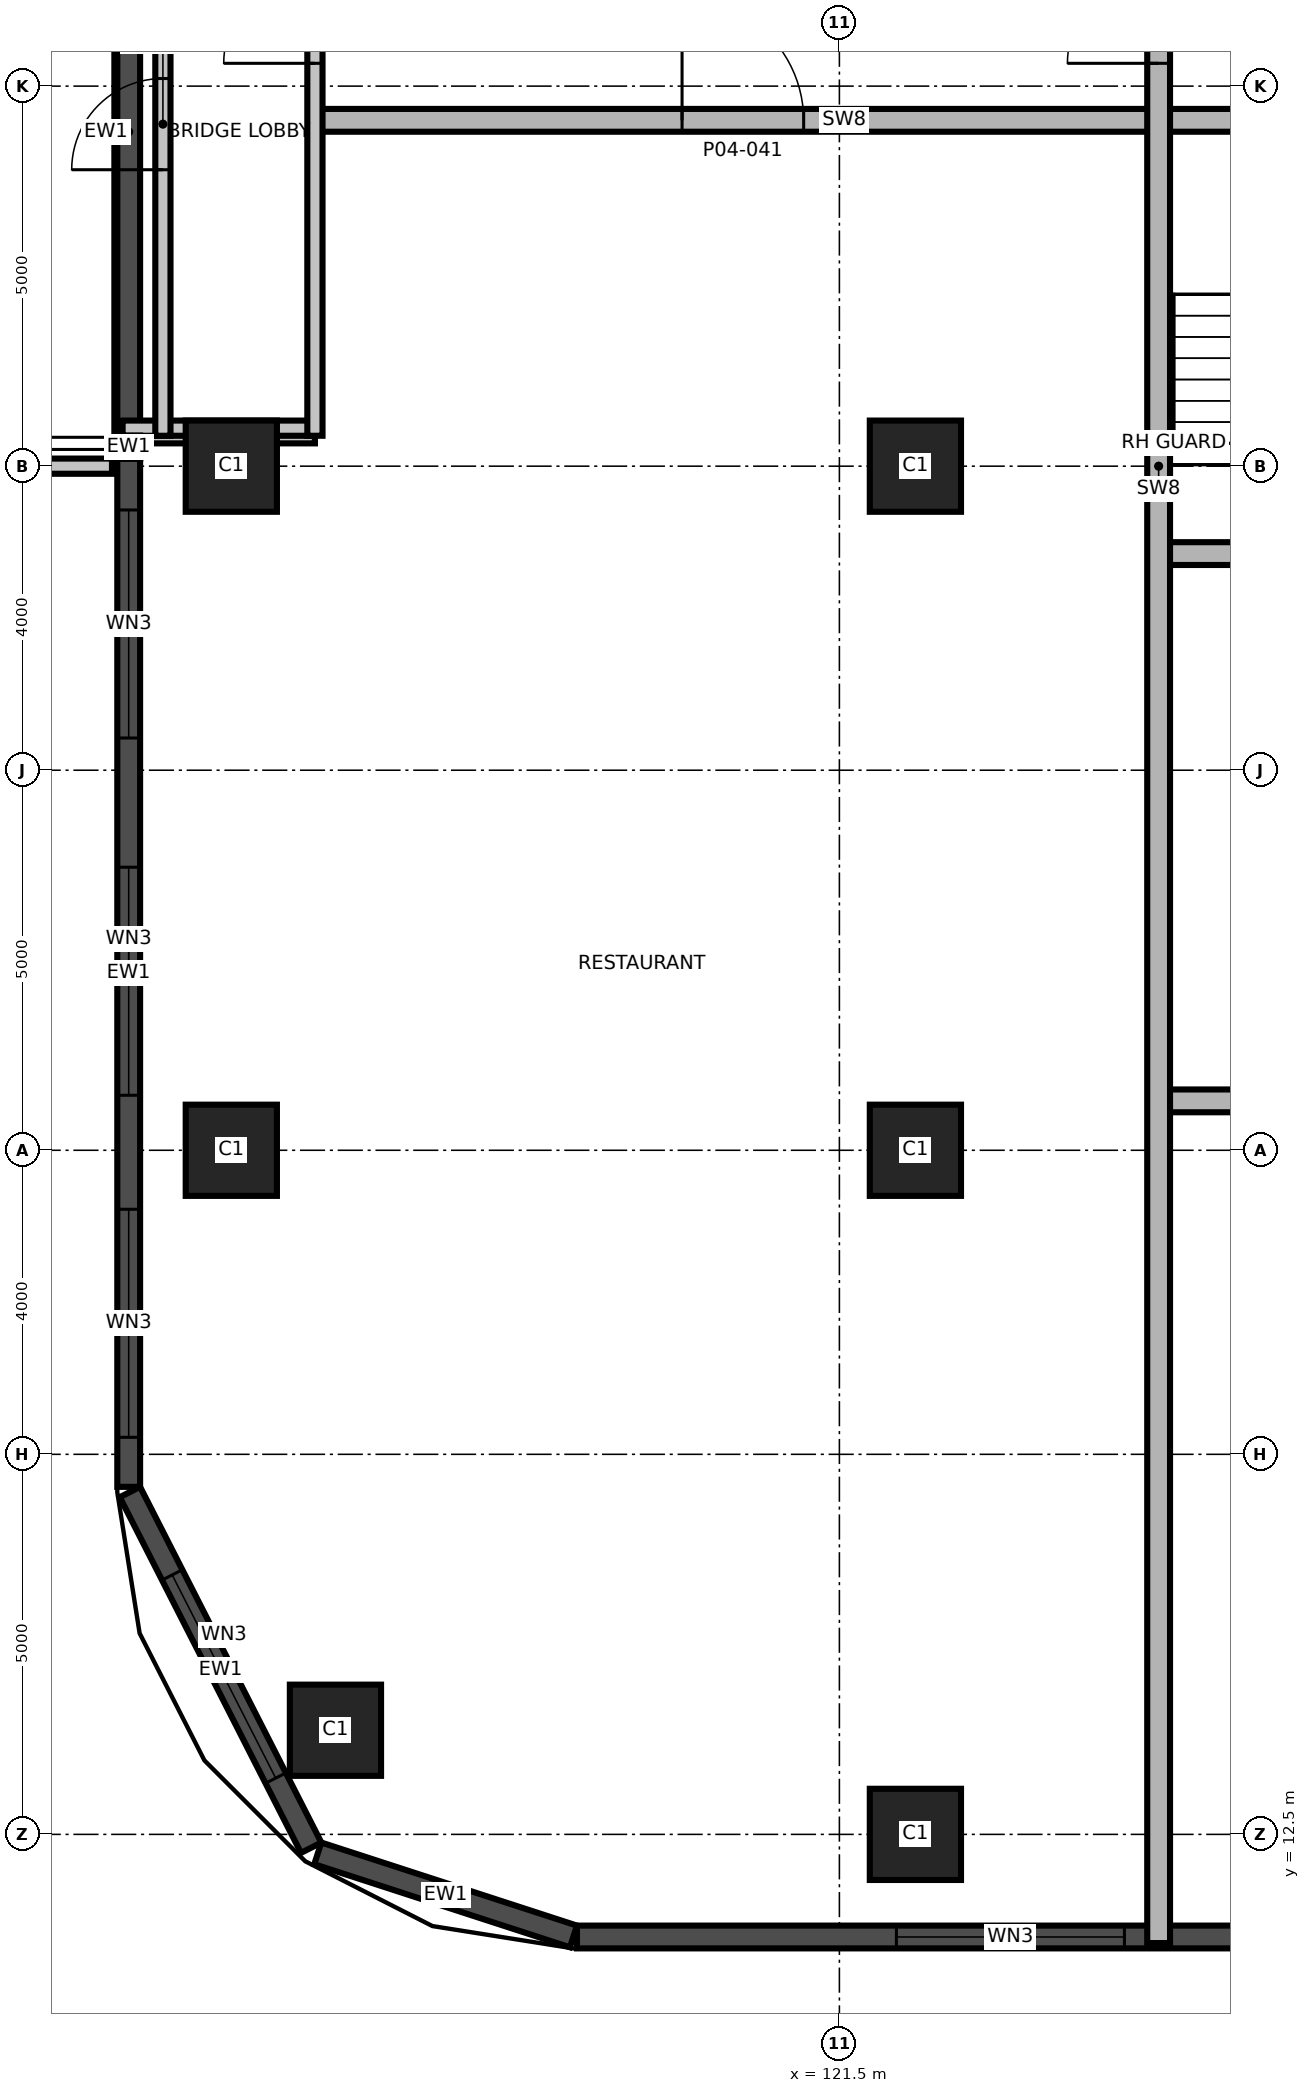
"""IFC4 building model, lengths in metres.
Left out: names, types, materials, properties, quantities, classifications, styles, units other than length and angle.
Written with IfcOpenShell. Run it as: python <this file> out.ifc"""

import sys

from ifc_helpers import new_model, si_unit, direction, frame, frame_2d, origin, origin_2d, place, context, subcontext, project, spatial, rectangle, extrude, element, fill, save


model = new_model("IFC4")
c1 = context("Model", 3, precision=1e-05, world=origin(), true_north=direction((0.0, 1.0)))
c2 = subcontext(c1, "Body", "Model", "MODEL_VIEW")
j1 = project(units=[si_unit("LENGTHUNIT", "METRE"), si_unit("PLANEANGLEUNIT", "RADIAN")], contexts=[c1])
p1 = place(None, origin())
s1 = spatial("IfcSite", under=j1, at=p1, CompositionType="ELEMENT")
p2 = place(p1, origin())
s2 = spatial("IfcBuilding", under=s1, at=p2, CompositionType="ELEMENT")
p3 = place(p2, frame((0.0, 0.0, 23.5)))
s3 = spatial("IfcBuildingStorey", under=s2, at=p3, CompositionType="ELEMENT", Elevation=23.5)
for number, where, z_axis, x_axis in (
    (1, (122.5, 12.5, 0.0), (0.0, 0.0, 1.0), (1.0, 0.0, 0.0)),
    (2, (114.87, 13.87, 0.0), (0.0, 0.0, 1.0), (1.0, 0.0, 0.0)),
    (3, (113.5, 21.5, 0.0), (0.0, 0.0, 1.0), (1.0, 0.0, 0.0)),
    (4, (122.5, 21.5, 0.0), (0.0, 0.0, 1.0), (1.0, 0.0, 0.0)),
    (5, (113.5, 30.5, 0.0), (0.0, 0.0, 1.0), (1.0, 0.0, 0.0)),
    (6, (122.5, 30.5, 0.0), (0.0, 0.0, 1.0), (1.0, 0.0, 0.0)),
):
    element("IfcColumn", number, at=place(p3, frame(where, z_axis=z_axis, x_axis=x_axis)), inside=s3, PredefinedType="COLUMN", context=c2, shape_type="SweptSolid", body=[
        extrude(rectangle(XDim=1.2, YDim=1.2, at=origin_2d()), origin(), (0.0, 0.0, 1.0), 5.0),
    ])
p4 = place(p3, frame((112.166, 17.004, 0.0), z_axis=(0.0, 0.0, 1.0), x_axis=(0.454006562826, -0.890998339455, 0.0)))
e7 = element("IfcWall", 7, at=p4, inside=s3, PredefinedType="SOLIDWALL", context=c2, shape_type="SweptSolid", body=[
    extrude(rectangle(XDim=5.252, YDim=0.3, at=frame_2d((2.626, 0.0))), origin(), (0.0, 0.0, 1.0), 4.7),
])
p5 = place(p4, frame((1.224, 0.0, 0.9)))
e8 = element("IfcOpeningElement", 8, at=p5, cuts=e7, PredefinedType="OPENING", context=c2, shape_type="SweptSolid", body=[
    extrude(rectangle(XDim=3.0, YDim=2.4, at=frame_2d((1.5, 1.2))), frame((0.0, 0.16, 0.0), z_axis=(0.0, -1.0, 0.0), x_axis=(1.0, 0.0, 0.0)), (0.0, 0.0, 1.0), 0.32),
])
p6 = place(p3, frame((114.638, 12.25, 0.0), z_axis=(0.0, 0.0, 1.0), x_axis=(0.951038127287, -0.309073584194, 0.0)))
e9 = element("IfcWall", 9, at=p6, inside=s3, PredefinedType="SOLIDWALL", context=c2, shape_type="SweptSolid", body=[
    extrude(rectangle(XDim=3.536, YDim=0.3, at=frame_2d((1.768, 0.0))), origin(), (0.0, 0.0, 1.0), 4.7),
])
p7 = place(p3, frame((118.048, 11.15, 0.0), z_axis=(0.0, 0.0, 1.0), x_axis=(1.0, 0.0, 0.0)))
e10 = element("IfcWall", 10, at=p7, inside=s3, PredefinedType="SOLIDWALL", context=c2, shape_type="SweptSolid", body=[
    extrude(rectangle(XDim=35.88, YDim=0.3, at=frame_2d((17.94, 0.0))), origin(), (0.0, 0.0, 1.0), 4.7),
])
p8 = place(p7, frame((4.202, 0.0, 0.9)))
e11 = element("IfcOpeningElement", 11, at=p8, cuts=e10, PredefinedType="OPENING", context=c2, shape_type="SweptSolid", body=[
    extrude(rectangle(XDim=3.0, YDim=2.4, at=frame_2d((1.5, 1.2))), frame((0.0, 0.16, 0.0), z_axis=(0.0, -1.0, 0.0), x_axis=(1.0, 0.0, 0.0)), (0.0, 0.0, 1.0), 0.32),
])
p9 = place(p7, frame((8.702, 0.0, 0.9)))
e12 = element("IfcOpeningElement", 12, at=p9, cuts=e10, PredefinedType="OPENING", context=c2, shape_type="SweptSolid", body=[
    extrude(rectangle(XDim=3.0, YDim=2.4, at=frame_2d((1.5, 1.2))), frame((0.0, 0.16, 0.0), z_axis=(0.0, -1.0, 0.0), x_axis=(1.0, 0.0, 0.0)), (0.0, 0.0, 1.0), 0.32),
])
p10 = place(p7, frame((13.202, 0.0, 0.9)))
e13 = element("IfcOpeningElement", 13, at=p10, cuts=e10, PredefinedType="OPENING", context=c2, shape_type="SweptSolid", body=[
    extrude(rectangle(XDim=3.0, YDim=2.4, at=frame_2d((1.5, 1.2))), frame((0.0, 0.16, 0.0), z_axis=(0.0, -1.0, 0.0), x_axis=(1.0, 0.0, 0.0)), (0.0, 0.0, 1.0), 0.32),
])
p11 = place(p7, frame((17.702, 0.0, 0.9)))
e14 = element("IfcOpeningElement", 14, at=p11, cuts=e10, PredefinedType="OPENING", context=c2, shape_type="SweptSolid", body=[
    extrude(rectangle(XDim=3.0, YDim=2.4, at=frame_2d((1.5, 1.2))), frame((0.0, 0.16, 0.0), z_axis=(0.0, -1.0, 0.0), x_axis=(1.0, 0.0, 0.0)), (0.0, 0.0, 1.0), 0.32),
])
p12 = place(p7, frame((22.202, 0.0, 0.9)))
e15 = element("IfcOpeningElement", 15, at=p12, cuts=e10, PredefinedType="OPENING", context=c2, shape_type="SweptSolid", body=[
    extrude(rectangle(XDim=3.0, YDim=2.4, at=frame_2d((1.5, 1.2))), frame((0.0, 0.16, 0.0), z_axis=(0.0, -1.0, 0.0), x_axis=(1.0, 0.0, 0.0)), (0.0, 0.0, 1.0), 0.32),
])
p13 = place(p7, frame((31.726, 0.0, 0.9)))
e16 = element("IfcOpeningElement", 16, at=p13, cuts=e10, PredefinedType="OPENING", context=c2, shape_type="SweptSolid", body=[
    extrude(rectangle(XDim=3.0, YDim=2.4, at=frame_2d((1.5, 1.2))), frame((0.0, 0.16, 0.0), z_axis=(0.0, -1.0, 0.0), x_axis=(1.0, 0.0, 0.0)), (0.0, 0.0, 1.0), 0.32),
])
p14 = place(p3, frame((112.15, 38.9, 3.15), z_axis=(0.0, 0.0, 1.0), x_axis=(0.0, -1.0, 0.0)))
e17 = element("IfcWall", 17, at=p14, inside=s3, PredefinedType="SOLIDWALL", context=c2, shape_type="SweptSolid", body=[
    extrude(rectangle(XDim=8.0, YDim=0.3, at=frame_2d((4.0, 0.0))), origin(), (0.0, 0.0, 1.0), 1.55),
])
p15 = place(p3, frame((112.15, 30.6, 0.0), z_axis=(0.0, 0.0, 1.0), x_axis=(0.0, -1.0, 0.0)))
e18 = element("IfcWall", 18, at=p15, inside=s3, PredefinedType="SOLIDWALL", context=c2, shape_type="SweptSolid", body=[
    extrude(rectangle(XDim=13.528, YDim=0.3, at=frame_2d((6.764, 0.0))), origin(), (0.0, 0.0, 1.0), 4.7),
])
p16 = place(p15, frame((0.676, 0.0, 0.9)))
e19 = element("IfcOpeningElement", 19, at=p16, cuts=e18, PredefinedType="OPENING", context=c2, shape_type="SweptSolid", body=[
    extrude(rectangle(XDim=3.0, YDim=2.4, at=frame_2d((1.5, 1.2))), frame((0.0, 0.16, 0.0), z_axis=(0.0, -1.0, 0.0), x_axis=(1.0, 0.0, 0.0)), (0.0, 0.0, 1.0), 0.32),
])
p17 = place(p15, frame((5.376, 0.0, 0.9)))
e20 = element("IfcOpeningElement", 20, at=p17, cuts=e18, PredefinedType="OPENING", context=c2, shape_type="SweptSolid", body=[
    extrude(rectangle(XDim=3.0, YDim=2.4, at=frame_2d((1.5, 1.2))), frame((0.0, 0.16, 0.0), z_axis=(0.0, -1.0, 0.0), x_axis=(1.0, 0.0, 0.0)), (0.0, 0.0, 1.0), 0.32),
])
p18 = place(p15, frame((9.876, 0.0, 0.9)))
e21 = element("IfcOpeningElement", 21, at=p18, cuts=e18, PredefinedType="OPENING", context=c2, shape_type="SweptSolid", body=[
    extrude(rectangle(XDim=3.0, YDim=2.4, at=frame_2d((1.5, 1.2))), frame((0.0, 0.16, 0.0), z_axis=(0.0, -1.0, 0.0), x_axis=(1.0, 0.0, 0.0)), (0.0, 0.0, 1.0), 0.32),
])
p19 = place(p3, frame((125.75, 22.15, 0.0), z_axis=(0.0, 0.0, 1.0), x_axis=(1.0, 0.0, 0.0)))
e22 = element("IfcWall", 22, at=p19, inside=s3, PredefinedType="SHEAR", context=c2, shape_type="SweptSolid", body=[
    extrude(rectangle(XDim=21.5, YDim=0.3, at=frame_2d((10.75, 0.0))), origin(), (0.0, 0.0, 1.0), 4.7),
])
p20 = place(p19, frame((17.0, 0.0, 0.0)))
e23 = element("IfcOpeningElement", 23, at=p20, cuts=e22, PredefinedType="OPENING", context=c2, shape_type="SweptSolid", body=[
    extrude(rectangle(XDim=1.0, YDim=2.1, at=frame_2d((0.5, 1.05))), frame((0.0, 0.16, 0.0), z_axis=(0.0, -1.0, 0.0), x_axis=(1.0, 0.0, 0.0)), (0.0, 0.0, 1.0), 0.32),
])
p21 = place(p19, frame((6.75, 0.0, 0.0)))
e24 = element("IfcOpeningElement", 24, at=p21, cuts=e22, PredefinedType="OPENING", context=c2, shape_type="SweptSolid", body=[
    extrude(rectangle(XDim=1.0, YDim=2.1, at=frame_2d((0.5, 1.05))), frame((0.0, 0.16, 0.0), z_axis=(0.0, -1.0, 0.0), x_axis=(1.0, 0.0, 0.0)), (0.0, 0.0, 1.0), 0.32),
])
p22 = place(p3, frame((125.7, 29.35, 0.0), z_axis=(0.0, 0.0, 1.0), x_axis=(1.0, 0.0, 0.0)))
e25 = element("IfcWall", 25, at=p22, inside=s3, PredefinedType="SHEAR", context=c2, shape_type="SweptSolid", body=[
    extrude(rectangle(XDim=2.83, YDim=0.3, at=frame_2d((1.415, 0.0))), origin(), (0.0, 0.0, 1.0), 4.7),
])
p23 = place(p22, frame((0.975, 0.0, 0.0)))
e26 = element("IfcOpeningElement", 26, at=p23, cuts=e25, PredefinedType="OPENING", context=c2, shape_type="SweptSolid", body=[
    extrude(rectangle(XDim=1.2, YDim=2.1, at=frame_2d((0.6, 1.05))), frame((0.0, 0.16, 0.0), z_axis=(0.0, -1.0, 0.0), x_axis=(1.0, 0.0, 0.0)), (0.0, 0.0, 1.0), 0.32),
])
p24 = place(p3, frame((105.07, 30.5, 0.0), z_axis=(0.0, 0.0, 1.0), x_axis=(1.0, 0.0, 0.0)))
e27 = element("IfcWall", 27, at=p24, inside=s3, PredefinedType="PARTITIONING", context=c2, shape_type="SweptSolid", body=[
    extrude(rectangle(XDim=6.86, YDim=0.2, at=frame_2d((3.43, 0.0))), origin(), (0.0, 0.0, 1.0), 4.7),
])
p25 = place(p3, frame((112.1, 30.9, 0.0), z_axis=(0.0, 0.0, 1.0), x_axis=(1.0, 0.0, 0.0)))
e28 = element("IfcWall", 28, at=p25, inside=s3, PredefinedType="PARTITIONING", context=c2, shape_type="SweptSolid", body=[
    extrude(rectangle(XDim=2.5, YDim=0.2, at=frame_2d((1.25, 0.0))), origin(), (0.0, 0.0, 1.0), 2.7),
])
p26 = place(p3, frame((112.07, 31.0, 0.0), z_axis=(0.0, 0.0, 1.0), x_axis=(1.0, 0.0, 0.0)))
e29 = element("IfcWall", 29, at=p26, inside=s3, PredefinedType="PARTITIONING", context=c2, shape_type="SweptSolid", body=[
    extrude(rectangle(XDim=2.53, YDim=0.2, at=frame_2d((1.265, 0.0))), origin(), (0.0, 0.0, 1.0), 4.7),
])
p27 = place(p3, frame((114.6, 35.05, 0.0), z_axis=(0.0, 0.0, 1.0), x_axis=(1.0, 0.0, 0.0)))
e30 = element("IfcWall", 30, at=p27, inside=s3, PredefinedType="SHEAR", context=c2, shape_type="SweptSolid", body=[
    extrude(rectangle(XDim=13.93, YDim=0.3, at=frame_2d((6.965, 0.0))), origin(), (0.0, 0.0, 1.0), 4.7),
])
p28 = place(p27, frame((4.83, 0.0, 0.0)))
e31 = element("IfcOpeningElement", 31, at=p28, cuts=e30, PredefinedType="OPENING", context=c2, shape_type="SweptSolid", body=[
    extrude(rectangle(XDim=1.6, YDim=2.1, at=frame_2d((0.8, 1.05))), frame((0.0, 0.16, 0.0), z_axis=(0.0, -1.0, 0.0), x_axis=(1.0, 0.0, 0.0)), (0.0, 0.0, 1.0), 0.32),
])
p29 = place(p3, frame((112.6, 30.9, 0.0), z_axis=(0.0, 0.0, 1.0), x_axis=(0.0, 1.0, 0.0)))
e32 = element("IfcWall", 32, at=p29, inside=s3, PredefinedType="PARTITIONING", context=c2, shape_type="SweptSolid", body=[
    extrude(rectangle(XDim=8.0, YDim=0.2, at=frame_2d((4.0, 0.0))), origin(), (0.0, 0.0, 1.0), 4.7),
])
p30 = place(p29, frame((3.5, 0.0, 0.0)))
e33 = element("IfcOpeningElement", 33, at=p30, cuts=e32, PredefinedType="OPENING", context=c2, shape_type="SweptSolid", body=[
    extrude(rectangle(XDim=1.2, YDim=2.1, at=frame_2d((0.6, 1.05))), frame((0.0, 0.11, 0.0), z_axis=(0.0, -1.0, 0.0), x_axis=(1.0, 0.0, 0.0)), (0.0, 0.0, 1.0), 0.22),
])
p31 = place(p3, frame((114.6, 30.9, 0.0), z_axis=(0.0, 0.0, 1.0), x_axis=(0.0, 1.0, 0.0)))
e34 = element("IfcWall", 34, at=p31, inside=s3, PredefinedType="PARTITIONING", context=c2, shape_type="SweptSolid", body=[
    extrude(rectangle(XDim=8.0, YDim=0.2, at=frame_2d((4.0, 0.0))), origin(), (0.0, 0.0, 1.0), 4.7),
])
p32 = place(p31, frame((4.9, 0.0, 0.0)))
e35 = element("IfcOpeningElement", 35, at=p32, cuts=e34, PredefinedType="OPENING", context=c2, shape_type="SweptSolid", body=[
    extrude(rectangle(XDim=1.2, YDim=2.1, at=frame_2d((0.6, 1.05))), frame((0.0, 0.11, 0.0), z_axis=(0.0, -1.0, 0.0), x_axis=(1.0, 0.0, 0.0)), (0.0, 0.0, 1.0), 0.22),
])
p33 = place(p3, frame((125.7, 11.07, 0.0), z_axis=(0.0, 0.0, 1.0), x_axis=(0.0, 1.0, 0.0)))
e36 = element("IfcWall", 36, at=p33, inside=s3, PredefinedType="SHEAR", context=c2, shape_type="SweptSolid", body=[
    extrude(rectangle(XDim=38.86, YDim=0.3, at=frame_2d((19.43, 0.0))), origin(), (0.0, 0.0, 1.0), 4.7),
])
p34 = place(p33, frame((24.73, 0.0, 0.0)))
e37 = element("IfcOpeningElement", 37, at=p34, cuts=e36, PredefinedType="OPENING", context=c2, shape_type="SweptSolid", body=[
    extrude(rectangle(XDim=1.2, YDim=2.1, at=frame_2d((0.6, 1.05))), frame((0.0, 0.16, 0.0), z_axis=(0.0, -1.0, 0.0), x_axis=(1.0, 0.0, 0.0)), (0.0, 0.0, 1.0), 0.32),
])
p35 = place(p3, frame((112.15, 30.6, 0.0), z_axis=(0.0, 0.0, 1.0), x_axis=(0.0, 1.0, 0.0)))
e38 = element("IfcWall", 38, at=p35, inside=s3, PredefinedType="SOLIDWALL", context=c2, shape_type="SweptSolid", body=[
    extrude(rectangle(XDim=0.3, YDim=0.3, at=frame_2d((0.15, 0.0))), origin(), (0.0, 0.0, 1.0), 2.7),
])
p36 = place(p3, frame((112.15, 30.6, 3.15), z_axis=(0.0, 0.0, 1.0), x_axis=(0.0, 1.0, 0.0)))
e39 = element("IfcWall", 39, at=p36, inside=s3, PredefinedType="SOLIDWALL", context=c2, shape_type="SweptSolid", body=[
    extrude(rectangle(XDim=0.3, YDim=0.3, at=frame_2d((0.15, 0.0))), origin(), (0.0, 0.0, 1.0), 1.55),
])
p37 = place(p5, origin())
e40 = element("IfcWindow", 40, at=p37, inside=s3, PartitioningType="SINGLE_PANEL", PredefinedType="WINDOW", context=c2, shape_type="SweptSolid", body=[
    extrude(rectangle(XDim=3.0, YDim=2.4, at=frame_2d((1.5, 1.2))), frame((0.0, 0.03, 0.0), z_axis=(0.0, -1.0, 0.0), x_axis=(1.0, 0.0, 0.0)), (0.0, 0.0, 1.0), 0.06),
])
fill(e8, e40)
p38 = place(p8, origin())
e41 = element("IfcWindow", 41, at=p38, inside=s3, PartitioningType="SINGLE_PANEL", PredefinedType="WINDOW", context=c2, shape_type="SweptSolid", body=[
    extrude(rectangle(XDim=3.0, YDim=2.4, at=frame_2d((1.5, 1.2))), frame((0.0, 0.03, 0.0), z_axis=(0.0, -1.0, 0.0), x_axis=(1.0, 0.0, 0.0)), (0.0, 0.0, 1.0), 0.06),
])
fill(e11, e41)
p39 = place(p16, origin())
e42 = element("IfcWindow", 42, at=p39, inside=s3, PartitioningType="SINGLE_PANEL", PredefinedType="WINDOW", context=c2, shape_type="SweptSolid", body=[
    extrude(rectangle(XDim=3.0, YDim=2.4, at=frame_2d((1.5, 1.2))), frame((0.0, 0.03, 0.0), z_axis=(0.0, -1.0, 0.0), x_axis=(1.0, 0.0, 0.0)), (0.0, 0.0, 1.0), 0.06),
])
fill(e19, e42)
p40 = place(p17, origin())
e43 = element("IfcWindow", 43, at=p40, inside=s3, PartitioningType="SINGLE_PANEL", PredefinedType="WINDOW", context=c2, shape_type="SweptSolid", body=[
    extrude(rectangle(XDim=3.0, YDim=2.4, at=frame_2d((1.5, 1.2))), frame((0.0, 0.03, 0.0), z_axis=(0.0, -1.0, 0.0), x_axis=(1.0, 0.0, 0.0)), (0.0, 0.0, 1.0), 0.06),
])
fill(e20, e43)
p41 = place(p18, origin())
e44 = element("IfcWindow", 44, at=p41, inside=s3, PartitioningType="SINGLE_PANEL", PredefinedType="WINDOW", context=c2, shape_type="SweptSolid", body=[
    extrude(rectangle(XDim=3.0, YDim=2.4, at=frame_2d((1.5, 1.2))), frame((0.0, 0.03, 0.0), z_axis=(0.0, -1.0, 0.0), x_axis=(1.0, 0.0, 0.0)), (0.0, 0.0, 1.0), 0.06),
])
fill(e21, e44)
p42 = place(p32, origin())
e45 = element("IfcDoor", 45, at=p42, inside=s3, OperationType="SINGLE_SWING_RIGHT", PredefinedType="DOOR", context=c2, shape_type="SweptSolid", body=[
    extrude(rectangle(XDim=1.2, YDim=2.1, at=frame_2d((0.6, 1.05))), frame((0.0, 0.025, 0.0), z_axis=(0.0, -1.0, 0.0), x_axis=(1.0, 0.0, 0.0)), (0.0, 0.0, 1.0), 0.05),
])
fill(e35, e45)
p43 = place(p34, origin())
e46 = element("IfcDoor", 46, at=p43, inside=s3, OperationType="SINGLE_SWING_LEFT", PredefinedType="DOOR", context=c2, shape_type="SweptSolid", body=[
    extrude(rectangle(XDim=1.2, YDim=2.1, at=frame_2d((0.6, 1.05))), frame((0.0, 0.025, 0.0), z_axis=(0.0, -1.0, 0.0), x_axis=(1.0, 0.0, 0.0)), (0.0, 0.0, 1.0), 0.05),
])
fill(e37, e46)
p44 = place(p28, origin())
e47 = element("IfcDoor", 47, at=p44, inside=s3, OperationType="SINGLE_SWING_LEFT", PredefinedType="DOOR", context=c2, shape_type="SweptSolid", body=[
    extrude(rectangle(XDim=1.6, YDim=2.1, at=frame_2d((0.8, 1.05))), frame((0.0, 0.025, 0.0), z_axis=(0.0, -1.0, 0.0), x_axis=(1.0, 0.0, 0.0)), (0.0, 0.0, 1.0), 0.05),
])
fill(e31, e47)
p45 = place(p30, origin())
e48 = element("IfcDoor", 48, at=p45, inside=s3, OperationType="SINGLE_SWING_RIGHT", PredefinedType="DOOR", context=c2, shape_type="SweptSolid", body=[
    extrude(rectangle(XDim=1.2, YDim=2.1, at=frame_2d((0.6, 1.05))), frame((0.0, 0.025, 0.0), z_axis=(0.0, -1.0, 0.0), x_axis=(1.0, 0.0, 0.0)), (0.0, 0.0, 1.0), 0.05),
])
fill(e33, e48)
save(model, sys.argv[1])
